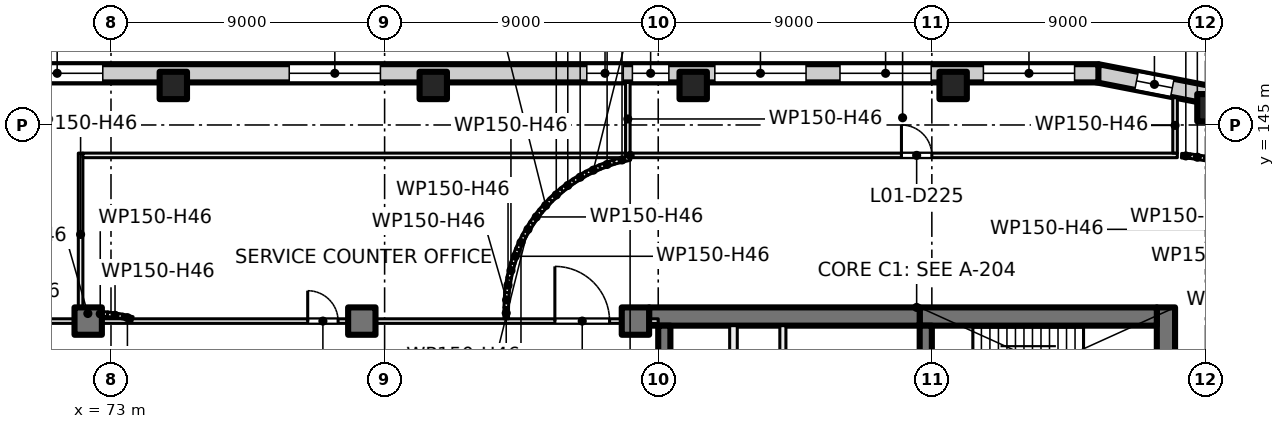
"""IFC4 building model, lengths in metres.
Left out: names, types, materials, properties, quantities, classifications, styles, units other than length and angle.
Written with IfcOpenShell. Run it as: python <this file> out.ifc"""

import sys

from ifc_helpers import new_model, si_unit, direction, frame, frame_2d, origin, origin_2d, place, context, subcontext, project, spatial, rectangle, extrude, element, fill, save


model = new_model("IFC4")
c1 = context("Model", 3, precision=1e-05, world=origin(), true_north=direction((0.0, 1.0)))
c2 = subcontext(c1, "Body", "Model", "MODEL_VIEW")
j1 = project(units=[si_unit("LENGTHUNIT", "METRE"), si_unit("PLANEANGLEUNIT", "RADIAN")], contexts=[c1])
p1 = place(None, origin())
s1 = spatial("IfcSite", under=j1, at=p1, CompositionType="ELEMENT")
p2 = place(p1, origin())
s2 = spatial("IfcBuilding", under=s1, at=p2, CompositionType="ELEMENT")
p3 = place(p2, frame((0.0, 0.0, 7.5)))
s3 = spatial("IfcBuildingStorey", under=s2, at=p3, CompositionType="ELEMENT", Elevation=7.5)
for number, where, z_axis, x_axis in (
    (1, (75.05, 146.3, 0.0), (0.0, 0.0, 1.0), (1.0, 0.0, 0.0)),
    (2, (83.6, 146.3, 0.0), (0.0, 0.0, 1.0), (1.0, 0.0, 0.0)),
    (3, (92.15, 146.3, 0.0), (0.0, 0.0, 1.0), (1.0, 0.0, 0.0)),
    (4, (100.7, 146.3, 0.0), (0.0, 0.0, 1.0), (1.0, 0.0, 0.0)),
    (5, (109.18, 145.567, 0.0), (0.0, 0.0, 1.0), (1.0, 0.0, 0.0)),
    (6, (72.25, 138.55, 0.0), (0.0, 0.0, 1.0), (1.0, 0.0, 0.0)),
    (7, (81.25, 138.55, 0.0), (0.0, 0.0, 1.0), (1.0, 0.0, 0.0)),
    (8, (90.25, 138.55, 0.0), (0.0, 0.0, 1.0), (1.0, 0.0, 0.0)),
):
    element("IfcColumn", number, at=place(p3, frame(where, z_axis=z_axis, x_axis=x_axis)), inside=s3, PredefinedType="COLUMN", context=c2, shape_type="SweptSolid", body=[
        extrude(rectangle(XDim=0.9, YDim=0.9, at=origin_2d()), origin(), (0.0, 0.0, 1.0), 5.0),
    ])
p4 = place(p3, frame((107.7, 139.0, 0.0), z_axis=(0.0, 0.0, 1.0), x_axis=(0.0, -1.0, 0.0)))
e9 = element("IfcWall", 9, at=p4, inside=s3, PredefinedType="SHEAR", context=c2, shape_type="SweptSolid", body=[
    extrude(rectangle(XDim=3.8, YDim=0.6, at=frame_2d((1.9, 0.0))), origin(), (0.0, 0.0, 1.0), 5.0),
])
p5 = place(p3, frame((107.4, 138.7, 0.0), z_axis=(0.0, 0.0, 1.0), x_axis=(-1.0, 0.0, 0.0)))
e10 = element("IfcWall", 10, at=p5, inside=s3, PredefinedType="SHEAR", context=c2, shape_type="SweptSolid", body=[
    extrude(rectangle(XDim=7.8, YDim=0.6, at=frame_2d((3.9, 0.0))), origin(), (0.0, 0.0, 1.0), 5.0),
])
p6 = place(p3, frame((99.6, 138.7, 0.0), z_axis=(0.0, 0.0, 1.0), x_axis=(-1.0, 0.0, 0.0)))
e11 = element("IfcWall", 11, at=p6, inside=s3, PredefinedType="SHEAR", context=c2, shape_type="SweptSolid", body=[
    extrude(rectangle(XDim=8.9, YDim=0.6, at=frame_2d((4.45, 0.0))), origin(), (0.0, 0.0, 1.0), 5.0),
])
p7 = place(p3, frame((99.8, 138.4, 0.0), z_axis=(0.0, 0.0, 1.0), x_axis=(0.0, -1.0, 0.0)))
e12 = element("IfcWall", 12, at=p7, inside=s3, PredefinedType="SHEAR", context=c2, shape_type="SweptSolid", body=[
    extrude(rectangle(XDim=2.8, YDim=0.4, at=frame_2d((1.4, 0.0))), origin(), (0.0, 0.0, 1.0), 5.0),
])
p8 = place(p7, frame((0.9, 0.0, 0.0)))
e13 = element("IfcOpeningElement", 13, at=p8, cuts=e12, PredefinedType="OPENING", context=c2, shape_type="SweptSolid", body=[
    extrude(rectangle(XDim=1.0, YDim=2.1, at=frame_2d((0.5, 1.05))), frame((0.0, 0.21, 0.0), z_axis=(0.0, -1.0, 0.0), x_axis=(1.0, 0.0, 0.0)), (0.0, 0.0, 1.0), 0.42),
])
p9 = place(p3, frame((91.2, 138.4, 0.0), z_axis=(0.0, 0.0, 1.0), x_axis=(0.0, -1.0, 0.0)))
e14 = element("IfcWall", 14, at=p9, inside=s3, PredefinedType="SHEAR", context=c2, shape_type="SweptSolid", body=[
    extrude(rectangle(XDim=8.6, YDim=0.4, at=frame_2d((4.3, 0.0))), origin(), (0.0, 0.0, 1.0), 5.0),
])
p10 = place(p3, frame((105.44, 146.702, 0.0), z_axis=(0.0, 0.0, 1.0), x_axis=(0.981593603981, -0.190981665674, 0.0)))
e15 = element("IfcWall", 15, at=p10, inside=s3, PredefinedType="SOLIDWALL", context=c2, shape_type="SweptSolid", body=[
    extrude(rectangle(XDim=4.025, YDim=0.6, at=frame_2d((2.013, 0.0))), origin(), (0.0, 0.0, 1.0), 4.6),
])
p11 = place(p10, frame((1.316, 0.0, 0.9)))
e16 = element("IfcOpeningElement", 16, at=p11, cuts=e15, PredefinedType="OPENING", context=c2, shape_type="SweptSolid", body=[
    extrude(rectangle(XDim=1.2, YDim=3.0, at=frame_2d((0.6, 1.5))), frame((0.0, 0.31, 0.0), z_axis=(0.0, -1.0, 0.0), x_axis=(1.0, 0.0, 0.0)), (0.0, 0.0, 1.0), 0.62),
])
p12 = place(p3, frame((46.114, 146.7, 0.0), z_axis=(0.0, 0.0, 1.0), x_axis=(1.0, 0.0, 0.0)))
e17 = element("IfcWall", 17, at=p12, inside=s3, PredefinedType="SOLIDWALL", context=c2, shape_type="SweptSolid", body=[
    extrude(rectangle(XDim=59.364, YDim=0.6, at=frame_2d((29.682, 0.0))), origin(), (0.0, 0.0, 1.0), 4.6),
])
p13 = place(p12, frame((5.35, 0.0, 0.9)))
e18 = element("IfcOpeningElement", 18, at=p13, cuts=e17, PredefinedType="OPENING", context=c2, shape_type="SweptSolid", body=[
    extrude(rectangle(XDim=3.0, YDim=3.0, at=frame_2d((1.5, 1.5))), frame((0.0, 0.31, 0.0), z_axis=(0.0, -1.0, 0.0), x_axis=(1.0, 0.0, 0.0)), (0.0, 0.0, 1.0), 0.62),
])
p14 = place(p12, frame((14.483, 0.0, 0.9)))
e19 = element("IfcOpeningElement", 19, at=p14, cuts=e17, PredefinedType="OPENING", context=c2, shape_type="SweptSolid", body=[
    extrude(rectangle(XDim=3.0, YDim=3.0, at=frame_2d((1.5, 1.5))), frame((0.0, 0.31, 0.0), z_axis=(0.0, -1.0, 0.0), x_axis=(1.0, 0.0, 0.0)), (0.0, 0.0, 1.0), 0.62),
])
p15 = place(p12, frame((23.615, 0.0, 0.9)))
e20 = element("IfcOpeningElement", 20, at=p15, cuts=e17, PredefinedType="OPENING", context=c2, shape_type="SweptSolid", body=[
    extrude(rectangle(XDim=3.0, YDim=3.0, at=frame_2d((1.5, 1.5))), frame((0.0, 0.31, 0.0), z_axis=(0.0, -1.0, 0.0), x_axis=(1.0, 0.0, 0.0)), (0.0, 0.0, 1.0), 0.62),
])
p16 = place(p12, frame((32.749, 0.0, 0.9)))
e21 = element("IfcOpeningElement", 21, at=p16, cuts=e17, PredefinedType="OPENING", context=c2, shape_type="SweptSolid", body=[
    extrude(rectangle(XDim=3.0, YDim=3.0, at=frame_2d((1.5, 1.5))), frame((0.0, 0.31, 0.0), z_axis=(0.0, -1.0, 0.0), x_axis=(1.0, 0.0, 0.0)), (0.0, 0.0, 1.0), 0.62),
])
p17 = place(p12, frame((42.536, 0.0, 0.9)))
e22 = element("IfcOpeningElement", 22, at=p17, cuts=e17, PredefinedType="OPENING", context=c2, shape_type="SweptSolid", body=[
    extrude(rectangle(XDim=1.2, YDim=3.0, at=frame_2d((0.6, 1.5))), frame((0.0, 0.31, 0.0), z_axis=(0.0, -1.0, 0.0), x_axis=(1.0, 0.0, 0.0)), (0.0, 0.0, 1.0), 0.62),
])
p18 = place(p12, frame((44.036, 0.0, 0.9)))
e23 = element("IfcOpeningElement", 23, at=p18, cuts=e17, PredefinedType="OPENING", context=c2, shape_type="SweptSolid", body=[
    extrude(rectangle(XDim=1.2, YDim=3.0, at=frame_2d((0.6, 1.5))), frame((0.0, 0.31, 0.0), z_axis=(0.0, -1.0, 0.0), x_axis=(1.0, 0.0, 0.0)), (0.0, 0.0, 1.0), 0.62),
])
p19 = place(p12, frame((46.748, 0.0, 0.9)))
e24 = element("IfcOpeningElement", 24, at=p19, cuts=e17, PredefinedType="OPENING", context=c2, shape_type="SweptSolid", body=[
    extrude(rectangle(XDim=3.0, YDim=3.0, at=frame_2d((1.5, 1.5))), frame((0.0, 0.31, 0.0), z_axis=(0.0, -1.0, 0.0), x_axis=(1.0, 0.0, 0.0)), (0.0, 0.0, 1.0), 0.62),
])
p20 = place(p12, frame((50.865, 0.0, 0.9)))
e25 = element("IfcOpeningElement", 25, at=p20, cuts=e17, PredefinedType="OPENING", context=c2, shape_type="SweptSolid", body=[
    extrude(rectangle(XDim=3.0, YDim=3.0, at=frame_2d((1.5, 1.5))), frame((0.0, 0.31, 0.0), z_axis=(0.0, -1.0, 0.0), x_axis=(1.0, 0.0, 0.0)), (0.0, 0.0, 1.0), 0.62),
])
p21 = place(p12, frame((55.581, 0.0, 0.9)))
e26 = element("IfcOpeningElement", 26, at=p21, cuts=e17, PredefinedType="OPENING", context=c2, shape_type="SweptSolid", body=[
    extrude(rectangle(XDim=3.0, YDim=3.0, at=frame_2d((1.5, 1.5))), frame((0.0, 0.31, 0.0), z_axis=(0.0, -1.0, 0.0), x_axis=(1.0, 0.0, 0.0)), (0.0, 0.0, 1.0), 0.62),
])
p22 = place(p3, frame((95.1, 130.0, 0.0), z_axis=(0.0, 0.0, 1.0), x_axis=(0.0, 1.0, 0.0)))
e27 = element("IfcWall", 27, at=p22, inside=s3, PredefinedType="PARTITIONING", context=c2, shape_type="SweptSolid", body=[
    extrude(rectangle(XDim=8.4, YDim=0.2, at=frame_2d((4.2, 0.0))), origin(), (0.0, 0.0, 1.0), 4.6),
])
p23 = place(p22, frame((5.25, 0.0, 0.0)))
e28 = element("IfcOpeningElement", 28, at=p23, cuts=e27, PredefinedType="OPENING", context=c2, shape_type="SweptSolid", body=[
    extrude(rectangle(XDim=1.5, YDim=2.1, at=frame_2d((0.75, 1.05))), frame((0.0, 0.11, 0.0), z_axis=(0.0, -1.0, 0.0), x_axis=(1.0, 0.0, 0.0)), (0.0, 0.0, 1.0), 0.22),
])
p24 = place(p3, frame((93.475, 130.0, 0.0), z_axis=(0.0, 0.0, 1.0), x_axis=(0.0, 1.0, 0.0)))
e29 = element("IfcWall", 29, at=p24, inside=s3, PredefinedType="PARTITIONING", context=c2, shape_type="SweptSolid", body=[
    extrude(rectangle(XDim=8.4, YDim=0.25, at=frame_2d((4.2, 0.0))), origin(), (0.0, 0.0, 1.0), 4.6),
])
p25 = place(p24, frame((1.675, 0.0, 0.0)))
e30 = element("IfcOpeningElement", 30, at=p25, cuts=e29, PredefinedType="OPENING", context=c2, shape_type="SweptSolid", body=[
    extrude(rectangle(XDim=0.8, YDim=2.1, at=frame_2d((0.4, 1.05))), frame((0.0, 0.135, 0.0), z_axis=(0.0, -1.0, 0.0), x_axis=(1.0, 0.0, 0.0)), (0.0, 0.0, 1.0), 0.27),
])
p26 = place(p24, frame((5.925, 0.0, 0.0)))
e31 = element("IfcOpeningElement", 31, at=p26, cuts=e29, PredefinedType="OPENING", context=c2, shape_type="SweptSolid", body=[
    extrude(rectangle(XDim=0.8, YDim=2.1, at=frame_2d((0.4, 1.05))), frame((0.0, 0.135, 0.0), z_axis=(0.0, -1.0, 0.0), x_axis=(1.0, 0.0, 0.0)), (0.0, 0.0, 1.0), 0.27),
])
p27 = place(p3, frame((49.825, 138.55, 0.0), z_axis=(0.0, 0.0, 1.0), x_axis=(1.0, 0.0, 0.0)))
e32 = element("IfcWall", 32, at=p27, inside=s3, PredefinedType="PARTITIONING", context=c2, shape_type="SweptSolid", body=[
    extrude(rectangle(XDim=41.175, YDim=0.15, at=frame_2d((20.587, 0.0))), origin(), (0.0, 0.0, 1.0), 4.6),
])
p28 = place(p27, frame((29.645, 0.0, 0.0)))
e33 = element("IfcOpeningElement", 33, at=p28, cuts=e32, PredefinedType="OPENING", context=c2, shape_type="SweptSolid", body=[
    extrude(rectangle(XDim=1.0, YDim=2.1, at=frame_2d((0.5, 1.05))), frame((0.0, 0.085, 0.0), z_axis=(0.0, -1.0, 0.0), x_axis=(1.0, 0.0, 0.0)), (0.0, 0.0, 1.0), 0.17),
])
p29 = place(p27, frame((37.775, 0.0, 0.0)))
e34 = element("IfcOpeningElement", 34, at=p29, cuts=e32, PredefinedType="OPENING", context=c2, shape_type="SweptSolid", body=[
    extrude(rectangle(XDim=1.8, YDim=2.1, at=frame_2d((0.9, 1.05))), frame((0.0, 0.085, 0.0), z_axis=(0.0, -1.0, 0.0), x_axis=(1.0, 0.0, 0.0)), (0.0, 0.0, 1.0), 0.17),
])
p30 = place(p3, frame((72.0, 138.725, 0.0), z_axis=(0.0, 0.0, 1.0), x_axis=(0.0, 1.0, 0.0)))
e35 = element("IfcWall", 35, at=p30, inside=s3, PredefinedType="PARTITIONING", context=c2, shape_type="SweptSolid", body=[
    extrude(rectangle(XDim=5.35, YDim=0.15, at=frame_2d((2.675, 0.0))), origin(), (0.0, 0.0, 1.0), 4.6),
])
p31 = place(p3, frame((72.075, 138.8, 0.0), z_axis=(0.0, 0.0, 1.0), x_axis=(1.0, 0.0, 0.0)))
e36 = element("IfcWall", 36, at=p31, inside=s3, PredefinedType="PARTITIONING", context=c2, shape_type="SweptSolid", body=[
    extrude(rectangle(XDim=0.327, YDim=0.15, at=frame_2d((0.164, 0.0))), origin(), (0.0, 0.0, 1.0), 4.6),
])
p32 = place(p3, frame((72.075, 144.0, 0.0), z_axis=(0.0, 0.0, 1.0), x_axis=(1.0, 0.0, 0.0)))
e37 = element("IfcWall", 37, at=p32, inside=s3, PredefinedType="PARTITIONING", context=c2, shape_type="SweptSolid", body=[
    extrude(rectangle(XDim=36.0, YDim=0.15, at=frame_2d((18.0, 0.0))), origin(), (0.0, 0.0, 1.0), 4.6),
])
p33 = place(p32, frame((26.925, 0.0, 0.0)))
e38 = element("IfcOpeningElement", 38, at=p33, cuts=e37, PredefinedType="OPENING", context=c2, shape_type="SweptSolid", body=[
    extrude(rectangle(XDim=1.0, YDim=2.1, at=frame_2d((0.5, 1.05))), frame((0.0, 0.085, 0.0), z_axis=(0.0, -1.0, 0.0), x_axis=(1.0, 0.0, 0.0)), (0.0, 0.0, 1.0), 0.17),
])
p34 = place(p3, frame((72.398, 138.8, 0.0), z_axis=(0.0, 0.0, 1.0), x_axis=(0.998815266503, -0.048662751665, 0.0)))
e39 = element("IfcWall", 39, at=p34, inside=s3, PredefinedType="PARTITIONING", context=c2, shape_type="SweptSolid", body=[
    extrude(rectangle(XDim=0.497, YDim=0.15, at=frame_2d((0.248, 0.0))), origin(), (0.0, 0.0, 1.0), 4.6),
])
p35 = place(p3, frame((72.886, 138.777, 0.0), z_axis=(0.0, 0.0, 1.0), x_axis=(0.988853572557, -0.148891275908, 0.0)))
e40 = element("IfcWall", 40, at=p35, inside=s3, PredefinedType="PARTITIONING", context=c2, shape_type="SweptSolid", body=[
    extrude(rectangle(XDim=0.499, YDim=0.15, at=frame_2d((0.249, 0.0))), origin(), (0.0, 0.0, 1.0), 4.6),
])
p36 = place(p3, frame((73.371, 138.705, 0.0), z_axis=(0.0, 0.0, 1.0), x_axis=(0.969811847647, -0.243854424119, 0.0)))
e41 = element("IfcWall", 41, at=p36, inside=s3, PredefinedType="PARTITIONING", context=c2, shape_type="SweptSolid", body=[
    extrude(rectangle(XDim=0.348, YDim=0.15, at=frame_2d((0.174, 0.0))), origin(), (0.0, 0.0, 1.0), 4.6),
])
p37 = place(p3, frame((86.0, 138.625, 0.0), z_axis=(0.0, 0.0, 1.0), x_axis=(0.0, 1.0, 0.0)))
e42 = element("IfcWall", 42, at=p37, inside=s3, PredefinedType="PARTITIONING", context=c2, shape_type="SweptSolid", body=[
    extrude(rectangle(XDim=0.377, YDim=0.15, at=frame_2d((0.188, 0.0))), origin(), (0.0, 0.0, 1.0), 4.6),
])
p38 = place(p3, frame((86.0, 138.998, 0.0), z_axis=(0.0, 0.0, 1.0), x_axis=(0.048196018647, 0.998837896651, 0.0)))
e43 = element("IfcWall", 43, at=p38, inside=s3, PredefinedType="PARTITIONING", context=c2, shape_type="SweptSolid", body=[
    extrude(rectangle(XDim=0.496, YDim=0.15, at=frame_2d((0.248, 0.0))), origin(), (0.0, 0.0, 1.0), 4.6),
])
p39 = place(p3, frame((86.023, 139.486, 0.0), z_axis=(0.0, 0.0, 1.0), x_axis=(0.148412307247, 0.988925572052, 0.0)))
e44 = element("IfcWall", 44, at=p39, inside=s3, PredefinedType="PARTITIONING", context=c2, shape_type="SweptSolid", body=[
    extrude(rectangle(XDim=0.499, YDim=0.15, at=frame_2d((0.249, 0.0))), origin(), (0.0, 0.0, 1.0), 4.6),
])
p40 = place(p3, frame((86.095, 139.971, 0.0), z_axis=(0.0, 0.0, 1.0), x_axis=(0.242650732785, 0.970113715952, 0.0)))
e45 = element("IfcWall", 45, at=p40, inside=s3, PredefinedType="PARTITIONING", context=c2, shape_type="SweptSolid", body=[
    extrude(rectangle(XDim=0.499, YDim=0.15, at=frame_2d((0.25, 0.0))), origin(), (0.0, 0.0, 1.0), 4.6),
])
for number, where, z_axis, x_axis in (
    (46, (86.214, 140.447, 0.0), (0.0, 0.0, 1.0), (0.337, 0.941, 0.0)),
    (47, (86.379, 140.91, 0.0), (0.0, 0.0, 1.0), (0.428, 0.904, 0.0)),
):
    element("IfcWall", number, at=place(p3, frame(where, z_axis=z_axis, x_axis=x_axis)), inside=s3, PredefinedType="PARTITIONING", context=c2, shape_type="SweptSolid", body=[
        extrude(rectangle(XDim=0.498, YDim=0.15, at=frame_2d((0.249, 0.0))), origin(), (0.0, 0.0, 1.0), 4.6),
    ])
p41 = place(p3, frame((86.588, 141.354, 0.0), z_axis=(0.0, 0.0, 1.0), x_axis=(0.515791778052, 0.85671397893, 0.0)))
e48 = element("IfcWall", 48, at=p41, inside=s3, PredefinedType="PARTITIONING", context=c2, shape_type="SweptSolid", body=[
    extrude(rectangle(XDim=0.499, YDim=0.15, at=frame_2d((0.249, 0.0))), origin(), (0.0, 0.0, 1.0), 4.6),
])
p42 = place(p3, frame((86.841, 141.775, 0.0), z_axis=(0.0, 0.0, 1.0), x_axis=(0.594570362092, 0.80404358372, 0.0)))
e49 = element("IfcWall", 49, at=p42, inside=s3, PredefinedType="PARTITIONING", context=c2, shape_type="SweptSolid", body=[
    extrude(rectangle(XDim=0.498, YDim=0.15, at=frame_2d((0.249, 0.0))), origin(), (0.0, 0.0, 1.0), 4.6),
])
for number, where, z_axis, x_axis in (
    (50, (87.133, 142.169, 0.0), (0.0, 0.0, 1.0), (0.67, 0.742, 0.0)),
    (51, (87.461, 142.533, 0.0), (0.0, 0.0, 1.0), (0.742, 0.67, 0.0)),
):
    element("IfcWall", number, at=place(p3, frame(where, z_axis=z_axis, x_axis=x_axis)), inside=s3, PredefinedType="PARTITIONING", context=c2, shape_type="SweptSolid", body=[
        extrude(rectangle(XDim=0.499, YDim=0.15, at=frame_2d((0.249, 0.0))), origin(), (0.0, 0.0, 1.0), 4.6),
    ])
p43 = place(p3, frame((87.825, 142.863, 0.0), z_axis=(0.0, 0.0, 1.0), x_axis=(0.80404358372, 0.594570362092, 0.0)))
e52 = element("IfcWall", 52, at=p43, inside=s3, PredefinedType="PARTITIONING", context=c2, shape_type="SweptSolid", body=[
    extrude(rectangle(XDim=0.498, YDim=0.15, at=frame_2d((0.249, 0.0))), origin(), (0.0, 0.0, 1.0), 4.6),
])
p44 = place(p3, frame((88.219, 143.155, 0.0), z_axis=(0.0, 0.0, 1.0), x_axis=(0.85671397893, 0.515791778052, 0.0)))
e53 = element("IfcWall", 53, at=p44, inside=s3, PredefinedType="PARTITIONING", context=c2, shape_type="SweptSolid", body=[
    extrude(rectangle(XDim=0.499, YDim=0.15, at=frame_2d((0.249, 0.0))), origin(), (0.0, 0.0, 1.0), 4.6),
])
for number, where, z_axis, x_axis in (
    (54, (88.64, 143.408, 0.0), (0.0, 0.0, 1.0), (0.904, 0.428, 0.0)),
    (55, (89.084, 143.618, 0.0), (0.0, 0.0, 1.0), (0.941, 0.337, 0.0)),
):
    element("IfcWall", number, at=place(p3, frame(where, z_axis=z_axis, x_axis=x_axis)), inside=s3, PredefinedType="PARTITIONING", context=c2, shape_type="SweptSolid", body=[
        extrude(rectangle(XDim=0.498, YDim=0.15, at=frame_2d((0.249, 0.0))), origin(), (0.0, 0.0, 1.0), 4.6),
    ])
p45 = place(p3, frame((89.545, 143.784, 0.0), z_axis=(0.0, 0.0, 1.0), x_axis=(0.970116111764, 0.242641154168, 0.0)))
e56 = element("IfcWall", 56, at=p45, inside=s3, PredefinedType="PARTITIONING", context=c2, shape_type="SweptSolid", body=[
    extrude(rectangle(XDim=0.544, YDim=0.15, at=frame_2d((0.272, 0.0))), origin(), (0.0, 0.0, 1.0), 4.6),
])
p46 = place(p3, frame((90.0, 143.995, 0.0), z_axis=(0.0, 0.0, 1.0), x_axis=(0.0, 1.0, 0.0)))
e57 = element("IfcWall", 57, at=p46, inside=s3, PredefinedType="PARTITIONING", context=c2, shape_type="SweptSolid", body=[
    extrude(rectangle(XDim=2.405, YDim=0.15, at=frame_2d((1.202, 0.0))), origin(), (0.0, 0.0, 1.0), 4.6),
])
p47 = place(p3, frame((108.0, 144.075, 0.0), z_axis=(0.0, 0.0, 1.0), x_axis=(0.0, 1.0, 0.0)))
e58 = element("IfcWall", 58, at=p47, inside=s3, PredefinedType="PARTITIONING", context=c2, shape_type="SweptSolid", body=[
    extrude(rectangle(XDim=1.823, YDim=0.15, at=frame_2d((0.912, 0.0))), origin(), (0.0, 0.0, 1.0), 4.6),
])
p48 = place(p3, frame((108.214, 143.99, 0.0), z_axis=(0.0, 0.0, 1.0), x_axis=(0.99876534507, -0.049676810357, 0.0)))
e59 = element("IfcWall", 59, at=p48, inside=s3, PredefinedType="PARTITIONING", context=c2, shape_type="SweptSolid", body=[
    extrude(rectangle(XDim=0.28, YDim=0.15, at=frame_2d((0.14, 0.0))), origin(), (0.0, 0.0, 1.0), 4.6),
])
p49 = place(p3, frame((108.486, 143.977, 0.0), z_axis=(0.0, 0.0, 1.0), x_axis=(0.988925572052, -0.148412307247, 0.0)))
e60 = element("IfcWall", 60, at=p49, inside=s3, PredefinedType="PARTITIONING", context=c2, shape_type="SweptSolid", body=[
    extrude(rectangle(XDim=0.499, YDim=0.15, at=frame_2d((0.249, 0.0))), origin(), (0.0, 0.0, 1.0), 4.6),
])
p50 = place(p3, frame((108.971, 143.905, 0.0), z_axis=(0.0, 0.0, 1.0), x_axis=(0.970113715952, -0.242650732785, 0.0)))
e61 = element("IfcWall", 61, at=p50, inside=s3, PredefinedType="PARTITIONING", context=c2, shape_type="SweptSolid", body=[
    extrude(rectangle(XDim=0.499, YDim=0.15, at=frame_2d((0.25, 0.0))), origin(), (0.0, 0.0, 1.0), 4.6),
])
p51 = place(p11, origin())
e62 = element("IfcWindow", 62, at=p51, inside=s3, PartitioningType="SINGLE_PANEL", PredefinedType="WINDOW", context=c2, shape_type="SweptSolid", body=[
    extrude(rectangle(XDim=1.2, YDim=3.0, at=frame_2d((0.6, 1.5))), frame((0.0, 0.03, 0.0), z_axis=(0.0, -1.0, 0.0), x_axis=(1.0, 0.0, 0.0)), (0.0, 0.0, 1.0), 0.06),
])
fill(e16, e62)
p52 = place(p15, origin())
e63 = element("IfcWindow", 63, at=p52, inside=s3, PartitioningType="SINGLE_PANEL", PredefinedType="WINDOW", context=c2, shape_type="SweptSolid", body=[
    extrude(rectangle(XDim=3.0, YDim=3.0, at=frame_2d((1.5, 1.5))), frame((0.0, 0.03, 0.0), z_axis=(0.0, -1.0, 0.0), x_axis=(1.0, 0.0, 0.0)), (0.0, 0.0, 1.0), 0.06),
])
fill(e20, e63)
p53 = place(p16, origin())
e64 = element("IfcWindow", 64, at=p53, inside=s3, PartitioningType="SINGLE_PANEL", PredefinedType="WINDOW", context=c2, shape_type="SweptSolid", body=[
    extrude(rectangle(XDim=3.0, YDim=3.0, at=frame_2d((1.5, 1.5))), frame((0.0, 0.03, 0.0), z_axis=(0.0, -1.0, 0.0), x_axis=(1.0, 0.0, 0.0)), (0.0, 0.0, 1.0), 0.06),
])
fill(e21, e64)
p54 = place(p17, origin())
e65 = element("IfcWindow", 65, at=p54, inside=s3, PartitioningType="SINGLE_PANEL", PredefinedType="WINDOW", context=c2, shape_type="SweptSolid", body=[
    extrude(rectangle(XDim=1.2, YDim=3.0, at=frame_2d((0.6, 1.5))), frame((0.0, 0.03, 0.0), z_axis=(0.0, -1.0, 0.0), x_axis=(1.0, 0.0, 0.0)), (0.0, 0.0, 1.0), 0.06),
])
fill(e22, e65)
p55 = place(p18, origin())
e66 = element("IfcWindow", 66, at=p55, inside=s3, PartitioningType="SINGLE_PANEL", PredefinedType="WINDOW", context=c2, shape_type="SweptSolid", body=[
    extrude(rectangle(XDim=1.2, YDim=3.0, at=frame_2d((0.6, 1.5))), frame((0.0, 0.03, 0.0), z_axis=(0.0, -1.0, 0.0), x_axis=(1.0, 0.0, 0.0)), (0.0, 0.0, 1.0), 0.06),
])
fill(e23, e66)
p56 = place(p19, origin())
e67 = element("IfcWindow", 67, at=p56, inside=s3, PartitioningType="SINGLE_PANEL", PredefinedType="WINDOW", context=c2, shape_type="SweptSolid", body=[
    extrude(rectangle(XDim=3.0, YDim=3.0, at=frame_2d((1.5, 1.5))), frame((0.0, 0.03, 0.0), z_axis=(0.0, -1.0, 0.0), x_axis=(1.0, 0.0, 0.0)), (0.0, 0.0, 1.0), 0.06),
])
fill(e24, e67)
p57 = place(p20, origin())
e68 = element("IfcWindow", 68, at=p57, inside=s3, PartitioningType="SINGLE_PANEL", PredefinedType="WINDOW", context=c2, shape_type="SweptSolid", body=[
    extrude(rectangle(XDim=3.0, YDim=3.0, at=frame_2d((1.5, 1.5))), frame((0.0, 0.03, 0.0), z_axis=(0.0, -1.0, 0.0), x_axis=(1.0, 0.0, 0.0)), (0.0, 0.0, 1.0), 0.06),
])
fill(e25, e68)
p58 = place(p21, origin())
e69 = element("IfcWindow", 69, at=p58, inside=s3, PartitioningType="SINGLE_PANEL", PredefinedType="WINDOW", context=c2, shape_type="SweptSolid", body=[
    extrude(rectangle(XDim=3.0, YDim=3.0, at=frame_2d((1.5, 1.5))), frame((0.0, 0.03, 0.0), z_axis=(0.0, -1.0, 0.0), x_axis=(1.0, 0.0, 0.0)), (0.0, 0.0, 1.0), 0.06),
])
fill(e26, e69)
p59 = place(p28, origin())
e70 = element("IfcDoor", 70, at=p59, inside=s3, OperationType="SINGLE_SWING_LEFT", PredefinedType="DOOR", context=c2, shape_type="SweptSolid", body=[
    extrude(rectangle(XDim=1.0, YDim=2.1, at=frame_2d((0.5, 1.05))), frame((0.0, 0.025, 0.0), z_axis=(0.0, -1.0, 0.0), x_axis=(1.0, 0.0, 0.0)), (0.0, 0.0, 1.0), 0.05),
])
fill(e33, e70)
p60 = place(p29, origin())
e71 = element("IfcDoor", 71, at=p60, inside=s3, OperationType="DOUBLE_DOOR_SINGLE_SWING", PredefinedType="DOOR", context=c2, shape_type="SweptSolid", body=[
    extrude(rectangle(XDim=1.8, YDim=2.1, at=frame_2d((0.9, 1.05))), frame((0.0, 0.025, 0.0), z_axis=(0.0, -1.0, 0.0), x_axis=(1.0, 0.0, 0.0)), (0.0, 0.0, 1.0), 0.05),
])
fill(e34, e71)
p61 = place(p33, origin())
e72 = element("IfcDoor", 72, at=p61, inside=s3, OperationType="SINGLE_SWING_LEFT", PredefinedType="DOOR", context=c2, shape_type="SweptSolid", body=[
    extrude(rectangle(XDim=1.0, YDim=2.1, at=frame_2d((0.5, 1.05))), frame((0.0, 0.025, 0.0), z_axis=(0.0, -1.0, 0.0), x_axis=(1.0, 0.0, 0.0)), (0.0, 0.0, 1.0), 0.05),
])
fill(e38, e72)
save(model, sys.argv[1])
